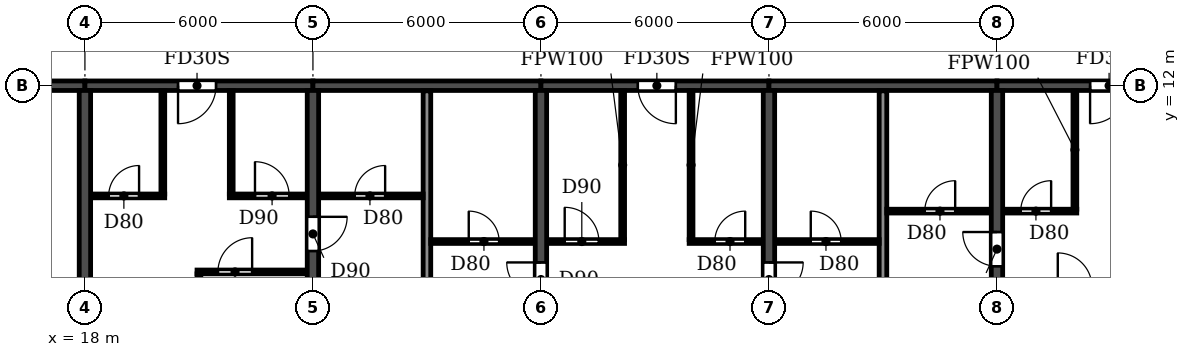
"""IFC4 building model, lengths in metres.
Left out: names, types, materials, properties, quantities, classifications, styles, units other than length and angle.
Written with IfcOpenShell. Run it as: python <this file> out.ifc"""

import sys

from ifc_helpers import new_model, si_unit, direction, frame, frame_2d, origin, place, context, subcontext, project, spatial, rectangle, extrude, element, fill, save


model = new_model("IFC4")
c1 = context("Model", 3, precision=1e-05, world=origin(), true_north=direction((0.0, 1.0)))
c2 = subcontext(c1, "Body", "Model", "MODEL_VIEW")
j1 = project(units=[si_unit("LENGTHUNIT", "METRE"), si_unit("PLANEANGLEUNIT", "RADIAN")], contexts=[c1])
p1 = place(None, origin())
s1 = spatial("IfcSite", under=j1, at=p1, CompositionType="ELEMENT")
p2 = place(p1, origin())
s2 = spatial("IfcBuilding", under=s1, at=p2, CompositionType="ELEMENT")
p3 = place(p2, frame((0.0, 0.0, 142.2)))
s3 = spatial("IfcBuildingStorey", under=s2, at=p3, CompositionType="ELEMENT", Elevation=142.2)
p4 = place(p3, frame((18.0, 0.2, 0.0), z_axis=(0.0, 0.0, 1.0), x_axis=(0.0, 1.0, 0.0)))
e1 = element("IfcWall", 1, at=p4, inside=s3, PredefinedType="SHEAR", context=c2, shape_type="SweptSolid", body=[
    extrude(rectangle(XDim=11.675, YDim=0.3, at=frame_2d((5.837, 0.0))), origin(), (0.0, 0.0, 1.0), 3.07),
])
p5 = place(p3, frame((24.0, 0.2, 0.0), z_axis=(0.0, 0.0, 1.0), x_axis=(0.0, 1.0, 0.0)))
e2 = element("IfcWall", 2, at=p5, inside=s3, PredefinedType="SHEAR", context=c2, shape_type="SweptSolid", body=[
    extrude(rectangle(XDim=11.675, YDim=0.3, at=frame_2d((5.837, 0.0))), origin(), (0.0, 0.0, 1.0), 3.07),
])
p6 = place(p5, frame((7.45, 0.0, 0.0)))
e3 = element("IfcOpeningElement", 3, at=p6, cuts=e2, PredefinedType="OPENING", context=c2, shape_type="SweptSolid", body=[
    extrude(rectangle(XDim=0.9, YDim=2.1, at=frame_2d((0.45, 1.05))), frame((0.0, 0.16, 0.0), z_axis=(0.0, -1.0, 0.0), x_axis=(1.0, 0.0, 0.0)), (0.0, 0.0, 1.0), 0.32),
])
p7 = place(p3, frame((30.0, 0.2, 0.0), z_axis=(0.0, 0.0, 1.0), x_axis=(0.0, 1.0, 0.0)))
e4 = element("IfcWall", 4, at=p7, inside=s3, PredefinedType="SHEAR", context=c2, shape_type="SweptSolid", body=[
    extrude(rectangle(XDim=11.675, YDim=0.3, at=frame_2d((5.837, 0.0))), origin(), (0.0, 0.0, 1.0), 3.07),
])
p8 = place(p7, frame((6.25, 0.0, 0.0)))
e5 = element("IfcOpeningElement", 5, at=p8, cuts=e4, PredefinedType="OPENING", context=c2, shape_type="SweptSolid", body=[
    extrude(rectangle(XDim=0.9, YDim=2.1, at=frame_2d((0.45, 1.05))), frame((0.0, 0.16, 0.0), z_axis=(0.0, -1.0, 0.0), x_axis=(1.0, 0.0, 0.0)), (0.0, 0.0, 1.0), 0.32),
])
p9 = place(p3, frame((36.0, 0.2, 0.0), z_axis=(0.0, 0.0, 1.0), x_axis=(0.0, 1.0, 0.0)))
e6 = element("IfcWall", 6, at=p9, inside=s3, PredefinedType="SHEAR", context=c2, shape_type="SweptSolid", body=[
    extrude(rectangle(XDim=11.675, YDim=0.3, at=frame_2d((5.837, 0.0))), origin(), (0.0, 0.0, 1.0), 3.07),
])
p10 = place(p9, frame((6.25, 0.0, 0.0)))
e7 = element("IfcOpeningElement", 7, at=p10, cuts=e6, PredefinedType="OPENING", context=c2, shape_type="SweptSolid", body=[
    extrude(rectangle(XDim=0.9, YDim=2.1, at=frame_2d((0.45, 1.05))), frame((0.0, 0.16, 0.0), z_axis=(0.0, -1.0, 0.0), x_axis=(1.0, 0.0, 0.0)), (0.0, 0.0, 1.0), 0.32),
])
p11 = place(p3, frame((42.0, 0.2, 0.0), z_axis=(0.0, 0.0, 1.0), x_axis=(0.0, 1.0, 0.0)))
e8 = element("IfcWall", 8, at=p11, inside=s3, PredefinedType="SHEAR", context=c2, shape_type="SweptSolid", body=[
    extrude(rectangle(XDim=11.675, YDim=0.3, at=frame_2d((5.837, 0.0))), origin(), (0.0, 0.0, 1.0), 3.07),
])
p12 = place(p11, frame((7.05, 0.0, 0.0)))
e9 = element("IfcOpeningElement", 9, at=p12, cuts=e8, PredefinedType="OPENING", context=c2, shape_type="SweptSolid", body=[
    extrude(rectangle(XDim=0.9, YDim=2.1, at=frame_2d((0.45, 1.05))), frame((0.0, 0.16, 0.0), z_axis=(0.0, -1.0, 0.0), x_axis=(1.0, 0.0, 0.0)), (0.0, 0.0, 1.0), 0.32),
])
p13 = place(p3, frame((12.2, 12.0, 0.0), z_axis=(0.0, 0.0, 1.0), x_axis=(1.0, 0.0, 0.0)))
e10 = element("IfcWall", 10, at=p13, inside=s3, PredefinedType="SHEAR", context=c2, shape_type="SweptSolid", body=[
    extrude(rectangle(XDim=5.8, YDim=0.25, at=frame_2d((2.9, 0.0))), origin(), (0.0, 0.0, 1.0), 2.47),
])
p14 = place(p13, frame((2.3, 0.0, 0.0)))
e11 = element("IfcOpeningElement", 11, at=p14, cuts=e10, PredefinedType="OPENING", context=c2, shape_type="SweptSolid", body=[
    extrude(rectangle(XDim=1.0, YDim=2.1, at=frame_2d((0.5, 1.05))), frame((0.0, 0.135, 0.0), z_axis=(0.0, -1.0, 0.0), x_axis=(1.0, 0.0, 0.0)), (0.0, 0.0, 1.0), 0.27),
])
p15 = place(p3, frame((18.0, 12.0, 0.0), z_axis=(0.0, 0.0, 1.0), x_axis=(1.0, 0.0, 0.0)))
e12 = element("IfcWall", 12, at=p15, inside=s3, PredefinedType="SHEAR", context=c2, shape_type="SweptSolid", body=[
    extrude(rectangle(XDim=6.0, YDim=0.25, at=frame_2d((3.0, 0.0))), origin(), (0.0, 0.0, 1.0), 2.47),
])
p16 = place(p15, frame((2.45, 0.0, 0.0)))
e13 = element("IfcOpeningElement", 13, at=p16, cuts=e12, PredefinedType="OPENING", context=c2, shape_type="SweptSolid", body=[
    extrude(rectangle(XDim=1.0, YDim=2.1, at=frame_2d((0.5, 1.05))), frame((0.0, 0.135, 0.0), z_axis=(0.0, -1.0, 0.0), x_axis=(1.0, 0.0, 0.0)), (0.0, 0.0, 1.0), 0.27),
])
p17 = place(p3, frame((24.0, 12.0, 0.0), z_axis=(0.0, 0.0, 1.0), x_axis=(1.0, 0.0, 0.0)))
e14 = element("IfcWall", 14, at=p17, inside=s3, PredefinedType="SHEAR", context=c2, shape_type="SweptSolid", body=[
    extrude(rectangle(XDim=6.0, YDim=0.25, at=frame_2d((3.0, 0.0))), origin(), (0.0, 0.0, 1.0), 2.47),
])
p18 = place(p3, frame((30.0, 12.0, 0.0), z_axis=(0.0, 0.0, 1.0), x_axis=(1.0, 0.0, 0.0)))
e15 = element("IfcWall", 15, at=p18, inside=s3, PredefinedType="SHEAR", context=c2, shape_type="SweptSolid", body=[
    extrude(rectangle(XDim=6.0, YDim=0.25, at=frame_2d((3.0, 0.0))), origin(), (0.0, 0.0, 1.0), 2.47),
])
p19 = place(p18, frame((2.55, 0.0, 0.0)))
e16 = element("IfcOpeningElement", 16, at=p19, cuts=e15, PredefinedType="OPENING", context=c2, shape_type="SweptSolid", body=[
    extrude(rectangle(XDim=1.0, YDim=2.1, at=frame_2d((0.5, 1.05))), frame((0.0, 0.135, 0.0), z_axis=(0.0, -1.0, 0.0), x_axis=(1.0, 0.0, 0.0)), (0.0, 0.0, 1.0), 0.27),
])
p20 = place(p3, frame((36.0, 12.0, 0.0), z_axis=(0.0, 0.0, 1.0), x_axis=(1.0, 0.0, 0.0)))
e17 = element("IfcWall", 17, at=p20, inside=s3, PredefinedType="SHEAR", context=c2, shape_type="SweptSolid", body=[
    extrude(rectangle(XDim=6.0, YDim=0.25, at=frame_2d((3.0, 0.0))), origin(), (0.0, 0.0, 1.0), 2.47),
])
p21 = place(p3, frame((42.0, 12.0, 0.0), z_axis=(0.0, 0.0, 1.0), x_axis=(1.0, 0.0, 0.0)))
e18 = element("IfcWall", 18, at=p21, inside=s3, PredefinedType="SHEAR", context=c2, shape_type="SweptSolid", body=[
    extrude(rectangle(XDim=6.0, YDim=0.25, at=frame_2d((3.0, 0.0))), origin(), (0.0, 0.0, 1.0), 2.47),
])
p22 = place(p21, frame((2.45, 0.0, 0.0)))
e19 = element("IfcOpeningElement", 19, at=p22, cuts=e18, PredefinedType="OPENING", context=c2, shape_type="SweptSolid", body=[
    extrude(rectangle(XDim=1.0, YDim=2.1, at=frame_2d((0.5, 1.05))), frame((0.0, 0.135, 0.0), z_axis=(0.0, -1.0, 0.0), x_axis=(1.0, 0.0, 0.0)), (0.0, 0.0, 1.0), 0.27),
])
for number, where, z_axis, x_axis in (
    (20, (27.0, 0.06, 0.0), (0.0, 0.0, 1.0), (0.0, 1.0, 0.0)),
    (21, (39.0, 0.06, 0.0), (0.0, 0.0, 1.0), (0.0, 1.0, 0.0)),
):
    element("IfcWall", number, at=place(p3, frame(where, z_axis=z_axis, x_axis=x_axis)), inside=s3, PredefinedType="PARTITIONING", context=c2, shape_type="SweptSolid", body=[
        extrude(rectangle(XDim=11.805, YDim=0.2, at=frame_2d((5.902, 0.0))), origin(), (0.0, 0.0, 1.0), 3.07),
    ])
p23 = place(p3, frame((20.95, 7.1, 0.0), z_axis=(0.0, 0.0, 1.0), x_axis=(1.0, 0.0, 0.0)))
e22 = element("IfcWall", 22, at=p23, inside=s3, PredefinedType="PARTITIONING", context=c2, shape_type="SweptSolid", body=[
    extrude(rectangle(XDim=2.89, YDim=0.1, at=frame_2d((1.445, 0.0))), origin(), (0.0, 0.0, 1.0), 3.07),
])
p24 = place(p23, frame((0.55, 0.0, 0.0)))
e23 = element("IfcOpeningElement", 23, at=p24, cuts=e22, PredefinedType="OPENING", context=c2, shape_type="SweptSolid", body=[
    extrude(rectangle(XDim=0.9, YDim=2.1, at=frame_2d((0.45, 1.05))), frame((0.0, 0.06, 0.0), z_axis=(0.0, -1.0, 0.0), x_axis=(1.0, 0.0, 0.0)), (0.0, 0.0, 1.0), 0.12),
])
p25 = place(p3, frame((27.1, 7.9, 0.0), z_axis=(0.0, 0.0, 1.0), x_axis=(1.0, 0.0, 0.0)))
e24 = element("IfcWall", 24, at=p25, inside=s3, PredefinedType="PARTITIONING", context=c2, shape_type="SweptSolid", body=[
    extrude(rectangle(XDim=2.74, YDim=0.1, at=frame_2d((1.37, 0.0))), origin(), (0.0, 0.0, 1.0), 3.07),
])
p26 = place(p25, frame((1.0, 0.0, 0.0)))
e25 = element("IfcOpeningElement", 25, at=p26, cuts=e24, PredefinedType="OPENING", context=c2, shape_type="SweptSolid", body=[
    extrude(rectangle(XDim=0.8, YDim=2.1, at=frame_2d((0.4, 1.05))), frame((0.0, 0.06, 0.0), z_axis=(0.0, -1.0, 0.0), x_axis=(1.0, 0.0, 0.0)), (0.0, 0.0, 1.0), 0.12),
])
p27 = place(p3, frame((30.16, 7.9, 0.0), z_axis=(0.0, 0.0, 1.0), x_axis=(1.0, 0.0, 0.0)))
e26 = element("IfcWall", 26, at=p27, inside=s3, PredefinedType="PARTITIONING", context=c2, shape_type="SweptSolid", body=[
    extrude(rectangle(XDim=2.04, YDim=0.1, at=frame_2d((1.02, 0.0))), origin(), (0.0, 0.0, 1.0), 3.07),
])
p28 = place(p27, frame((0.465, 0.0, 0.0)))
e27 = element("IfcOpeningElement", 27, at=p28, cuts=e26, PredefinedType="OPENING", context=c2, shape_type="SweptSolid", body=[
    extrude(rectangle(XDim=0.9, YDim=2.1, at=frame_2d((0.45, 1.05))), frame((0.0, 0.06, 0.0), z_axis=(0.0, -1.0, 0.0), x_axis=(1.0, 0.0, 0.0)), (0.0, 0.0, 1.0), 0.12),
])
p29 = place(p3, frame((33.9, 7.9, 0.0), z_axis=(0.0, 0.0, 1.0), x_axis=(1.0, 0.0, 0.0)))
e28 = element("IfcWall", 28, at=p29, inside=s3, PredefinedType="PARTITIONING", context=c2, shape_type="SweptSolid", body=[
    extrude(rectangle(XDim=1.94, YDim=0.1, at=frame_2d((0.97, 0.0))), origin(), (0.0, 0.0, 1.0), 3.07),
])
p30 = place(p29, frame((0.675, 0.0, 0.0)))
e29 = element("IfcOpeningElement", 29, at=p30, cuts=e28, PredefinedType="OPENING", context=c2, shape_type="SweptSolid", body=[
    extrude(rectangle(XDim=0.8, YDim=2.1, at=frame_2d((0.4, 1.05))), frame((0.0, 0.06, 0.0), z_axis=(0.0, -1.0, 0.0), x_axis=(1.0, 0.0, 0.0)), (0.0, 0.0, 1.0), 0.12),
])
p31 = place(p3, frame((36.16, 7.9, 0.0), z_axis=(0.0, 0.0, 1.0), x_axis=(1.0, 0.0, 0.0)))
e30 = element("IfcWall", 30, at=p31, inside=s3, PredefinedType="PARTITIONING", context=c2, shape_type="SweptSolid", body=[
    extrude(rectangle(XDim=2.74, YDim=0.1, at=frame_2d((1.37, 0.0))), origin(), (0.0, 0.0, 1.0), 3.07),
])
p32 = place(p31, frame((0.94, 0.0, 0.0)))
e31 = element("IfcOpeningElement", 31, at=p32, cuts=e30, PredefinedType="OPENING", context=c2, shape_type="SweptSolid", body=[
    extrude(rectangle(XDim=0.8, YDim=2.1, at=frame_2d((0.4, 1.05))), frame((0.0, 0.06, 0.0), z_axis=(0.0, -1.0, 0.0), x_axis=(1.0, 0.0, 0.0)), (0.0, 0.0, 1.0), 0.12),
])
p33 = place(p3, frame((39.1, 8.7, 0.0), z_axis=(0.0, 0.0, 1.0), x_axis=(1.0, 0.0, 0.0)))
e32 = element("IfcWall", 32, at=p33, inside=s3, PredefinedType="PARTITIONING", context=c2, shape_type="SweptSolid", body=[
    extrude(rectangle(XDim=2.74, YDim=0.1, at=frame_2d((1.37, 0.0))), origin(), (0.0, 0.0, 1.0), 3.07),
])
p34 = place(p33, frame((1.0, 0.0, 0.0)))
e33 = element("IfcOpeningElement", 33, at=p34, cuts=e32, PredefinedType="OPENING", context=c2, shape_type="SweptSolid", body=[
    extrude(rectangle(XDim=0.8, YDim=2.1, at=frame_2d((0.4, 1.05))), frame((0.0, 0.06, 0.0), z_axis=(0.0, -1.0, 0.0), x_axis=(1.0, 0.0, 0.0)), (0.0, 0.0, 1.0), 0.12),
])
p35 = place(p3, frame((42.16, 8.7, 0.0), z_axis=(0.0, 0.0, 1.0), x_axis=(1.0, 0.0, 0.0)))
e34 = element("IfcWall", 34, at=p35, inside=s3, PredefinedType="PARTITIONING", context=c2, shape_type="SweptSolid", body=[
    extrude(rectangle(XDim=1.94, YDim=0.1, at=frame_2d((0.97, 0.0))), origin(), (0.0, 0.0, 1.0), 3.07),
])
p36 = place(p35, frame((0.465, 0.0, 0.0)))
e35 = element("IfcOpeningElement", 35, at=p36, cuts=e34, PredefinedType="OPENING", context=c2, shape_type="SweptSolid", body=[
    extrude(rectangle(XDim=0.8, YDim=2.1, at=frame_2d((0.4, 1.05))), frame((0.0, 0.06, 0.0), z_axis=(0.0, -1.0, 0.0), x_axis=(1.0, 0.0, 0.0)), (0.0, 0.0, 1.0), 0.12),
])
p37 = place(p3, frame((18.16, 9.1, 0.0), z_axis=(0.0, 0.0, 1.0), x_axis=(1.0, 0.0, 0.0)))
e36 = element("IfcWall", 36, at=p37, inside=s3, PredefinedType="PARTITIONING", context=c2, shape_type="SweptSolid", body=[
    extrude(rectangle(XDim=1.94, YDim=0.1, at=frame_2d((0.97, 0.0))), origin(), (0.0, 0.0, 1.0), 3.07),
])
p38 = place(p37, frame((0.465, 0.0, 0.0)))
e37 = element("IfcOpeningElement", 37, at=p38, cuts=e36, PredefinedType="OPENING", context=c2, shape_type="SweptSolid", body=[
    extrude(rectangle(XDim=0.8, YDim=2.1, at=frame_2d((0.4, 1.05))), frame((0.0, 0.06, 0.0), z_axis=(0.0, -1.0, 0.0), x_axis=(1.0, 0.0, 0.0)), (0.0, 0.0, 1.0), 0.12),
])
p39 = place(p3, frame((21.8, 9.1, 0.0), z_axis=(0.0, 0.0, 1.0), x_axis=(1.0, 0.0, 0.0)))
e38 = element("IfcWall", 38, at=p39, inside=s3, PredefinedType="PARTITIONING", context=c2, shape_type="SweptSolid", body=[
    extrude(rectangle(XDim=2.04, YDim=0.1, at=frame_2d((1.02, 0.0))), origin(), (0.0, 0.0, 1.0), 3.07),
])
p40 = place(p39, frame((0.675, 0.0, 0.0)))
e39 = element("IfcOpeningElement", 39, at=p40, cuts=e38, PredefinedType="OPENING", context=c2, shape_type="SweptSolid", body=[
    extrude(rectangle(XDim=0.9, YDim=2.1, at=frame_2d((0.45, 1.05))), frame((0.0, 0.06, 0.0), z_axis=(0.0, -1.0, 0.0), x_axis=(1.0, 0.0, 0.0)), (0.0, 0.0, 1.0), 0.12),
])
p41 = place(p3, frame((24.16, 9.1, 0.0), z_axis=(0.0, 0.0, 1.0), x_axis=(1.0, 0.0, 0.0)))
e40 = element("IfcWall", 40, at=p41, inside=s3, PredefinedType="PARTITIONING", context=c2, shape_type="SweptSolid", body=[
    extrude(rectangle(XDim=2.74, YDim=0.1, at=frame_2d((1.37, 0.0))), origin(), (0.0, 0.0, 1.0), 3.07),
])
p42 = place(p41, frame((0.94, 0.0, 0.0)))
e41 = element("IfcOpeningElement", 41, at=p42, cuts=e40, PredefinedType="OPENING", context=c2, shape_type="SweptSolid", body=[
    extrude(rectangle(XDim=0.8, YDim=2.1, at=frame_2d((0.4, 1.05))), frame((0.0, 0.06, 0.0), z_axis=(0.0, -1.0, 0.0), x_axis=(1.0, 0.0, 0.0)), (0.0, 0.0, 1.0), 0.12),
])
p43 = place(p3, frame((20.05, 9.15, 0.0), z_axis=(0.0, 0.0, 1.0), x_axis=(0.0, 1.0, 0.0)))
e42 = element("IfcWall", 42, at=p43, inside=s3, PredefinedType="PARTITIONING", context=c2, shape_type="SweptSolid", body=[
    extrude(rectangle(XDim=2.715, YDim=0.1, at=frame_2d((1.357, 0.0))), origin(), (0.0, 0.0, 1.0), 3.07),
])
p44 = place(p3, frame((21.0, 0.06, 0.0), z_axis=(0.0, 0.0, 1.0), x_axis=(0.0, 1.0, 0.0)))
e43 = element("IfcWall", 43, at=p44, inside=s3, PredefinedType="PARTITIONING", context=c2, shape_type="SweptSolid", body=[
    extrude(rectangle(XDim=6.99, YDim=0.1, at=frame_2d((3.495, 0.0))), origin(), (0.0, 0.0, 1.0), 3.07),
])
p45 = place(p3, frame((21.85, 9.15, 0.0), z_axis=(0.0, 0.0, 1.0), x_axis=(0.0, 1.0, 0.0)))
e44 = element("IfcWall", 44, at=p45, inside=s3, PredefinedType="PARTITIONING", context=c2, shape_type="SweptSolid", body=[
    extrude(rectangle(XDim=2.715, YDim=0.1, at=frame_2d((1.357, 0.0))), origin(), (0.0, 0.0, 1.0), 3.07),
])
for number, where, z_axis, x_axis in (
    (45, (32.15, 7.95, 0.0), (0.0, 0.0, 1.0), (0.0, 1.0, 0.0)),
    (46, (33.95, 7.95, 0.0), (0.0, 0.0, 1.0), (0.0, 1.0, 0.0)),
):
    element("IfcWall", number, at=place(p3, frame(where, z_axis=z_axis, x_axis=x_axis)), inside=s3, PredefinedType="PARTITIONING", context=c2, shape_type="SweptSolid", body=[
        extrude(rectangle(XDim=3.915, YDim=0.1, at=frame_2d((1.958, 0.0))), origin(), (0.0, 0.0, 1.0), 3.07),
    ])
p46 = place(p3, frame((44.05, 8.75, 0.0), z_axis=(0.0, 0.0, 1.0), x_axis=(0.0, 1.0, 0.0)))
e47 = element("IfcWall", 47, at=p46, inside=s3, PredefinedType="PARTITIONING", context=c2, shape_type="SweptSolid", body=[
    extrude(rectangle(XDim=3.115, YDim=0.1, at=frame_2d((1.558, 0.0))), origin(), (0.0, 0.0, 1.0), 3.07),
])
p47 = place(p42, origin())
e48 = element("IfcDoor", 48, at=p47, inside=s3, OperationType="SINGLE_SWING_RIGHT", PredefinedType="DOOR", context=c2, shape_type="SweptSolid", body=[
    extrude(rectangle(XDim=0.8, YDim=2.1, at=frame_2d((0.4, 1.05))), frame((0.0, 0.025, 0.0), z_axis=(0.0, -1.0, 0.0), x_axis=(1.0, 0.0, 0.0)), (0.0, 0.0, 1.0), 0.05),
])
fill(e41, e48)
p48 = place(p38, origin())
e49 = element("IfcDoor", 49, at=p48, inside=s3, OperationType="SINGLE_SWING_RIGHT", PredefinedType="DOOR", context=c2, shape_type="SweptSolid", body=[
    extrude(rectangle(XDim=0.8, YDim=2.1, at=frame_2d((0.4, 1.05))), frame((0.0, 0.025, 0.0), z_axis=(0.0, -1.0, 0.0), x_axis=(1.0, 0.0, 0.0)), (0.0, 0.0, 1.0), 0.05),
])
fill(e37, e49)
p49 = place(p16, frame((1.0, 0.0, 0.0), z_axis=(0.0, 0.0, 1.0), x_axis=(-1.0, 0.0, 0.0)))
e50 = element("IfcDoor", 50, at=p49, inside=s3, OperationType="SINGLE_SWING_RIGHT", PredefinedType="DOOR", context=c2, shape_type="SweptSolid", body=[
    extrude(rectangle(XDim=1.0, YDim=2.1, at=frame_2d((0.5, 1.05))), frame((0.0, 0.025, 0.0), z_axis=(0.0, -1.0, 0.0), x_axis=(1.0, 0.0, 0.0)), (0.0, 0.0, 1.0), 0.05),
])
fill(e13, e50)
p50 = place(p24, origin())
e51 = element("IfcDoor", 51, at=p50, inside=s3, OperationType="SINGLE_SWING_RIGHT", PredefinedType="DOOR", context=c2, shape_type="SweptSolid", body=[
    extrude(rectangle(XDim=0.9, YDim=2.1, at=frame_2d((0.45, 1.05))), frame((0.0, 0.025, 0.0), z_axis=(0.0, -1.0, 0.0), x_axis=(1.0, 0.0, 0.0)), (0.0, 0.0, 1.0), 0.05),
])
fill(e23, e51)
p51 = place(p40, origin())
e52 = element("IfcDoor", 52, at=p51, inside=s3, OperationType="SINGLE_SWING_LEFT", PredefinedType="DOOR", context=c2, shape_type="SweptSolid", body=[
    extrude(rectangle(XDim=0.9, YDim=2.1, at=frame_2d((0.45, 1.05))), frame((0.0, 0.025, 0.0), z_axis=(0.0, -1.0, 0.0), x_axis=(1.0, 0.0, 0.0)), (0.0, 0.0, 1.0), 0.05),
])
fill(e39, e52)
p52 = place(p6, frame((0.9, 0.0, 0.0), z_axis=(0.0, 0.0, 1.0), x_axis=(-1.0, 0.0, 0.0)))
e53 = element("IfcDoor", 53, at=p52, inside=s3, OperationType="SINGLE_SWING_LEFT", PredefinedType="DOOR", context=c2, shape_type="SweptSolid", body=[
    extrude(rectangle(XDim=0.9, YDim=2.1, at=frame_2d((0.45, 1.05))), frame((0.0, 0.025, 0.0), z_axis=(0.0, -1.0, 0.0), x_axis=(1.0, 0.0, 0.0)), (0.0, 0.0, 1.0), 0.05),
])
fill(e3, e53)
p53 = place(p26, origin())
e54 = element("IfcDoor", 54, at=p53, inside=s3, OperationType="SINGLE_SWING_LEFT", PredefinedType="DOOR", context=c2, shape_type="SweptSolid", body=[
    extrude(rectangle(XDim=0.8, YDim=2.1, at=frame_2d((0.4, 1.05))), frame((0.0, 0.025, 0.0), z_axis=(0.0, -1.0, 0.0), x_axis=(1.0, 0.0, 0.0)), (0.0, 0.0, 1.0), 0.05),
])
fill(e25, e54)
p54 = place(p32, origin())
e55 = element("IfcDoor", 55, at=p54, inside=s3, OperationType="SINGLE_SWING_LEFT", PredefinedType="DOOR", context=c2, shape_type="SweptSolid", body=[
    extrude(rectangle(XDim=0.8, YDim=2.1, at=frame_2d((0.4, 1.05))), frame((0.0, 0.025, 0.0), z_axis=(0.0, -1.0, 0.0), x_axis=(1.0, 0.0, 0.0)), (0.0, 0.0, 1.0), 0.05),
])
fill(e31, e55)
p55 = place(p8, origin())
e56 = element("IfcDoor", 56, at=p55, inside=s3, OperationType="SINGLE_SWING_RIGHT", PredefinedType="DOOR", context=c2, shape_type="SweptSolid", body=[
    extrude(rectangle(XDim=0.9, YDim=2.1, at=frame_2d((0.45, 1.05))), frame((0.0, 0.025, 0.0), z_axis=(0.0, -1.0, 0.0), x_axis=(1.0, 0.0, 0.0)), (0.0, 0.0, 1.0), 0.05),
])
fill(e5, e56)
p56 = place(p28, origin())
e57 = element("IfcDoor", 57, at=p56, inside=s3, OperationType="SINGLE_SWING_LEFT", PredefinedType="DOOR", context=c2, shape_type="SweptSolid", body=[
    extrude(rectangle(XDim=0.9, YDim=2.1, at=frame_2d((0.45, 1.05))), frame((0.0, 0.025, 0.0), z_axis=(0.0, -1.0, 0.0), x_axis=(1.0, 0.0, 0.0)), (0.0, 0.0, 1.0), 0.05),
])
fill(e27, e57)
p57 = place(p19, frame((1.0, 0.0, 0.0), z_axis=(0.0, 0.0, 1.0), x_axis=(-1.0, 0.0, 0.0)))
e58 = element("IfcDoor", 58, at=p57, inside=s3, OperationType="SINGLE_SWING_LEFT", PredefinedType="DOOR", context=c2, shape_type="SweptSolid", body=[
    extrude(rectangle(XDim=1.0, YDim=2.1, at=frame_2d((0.5, 1.05))), frame((0.0, 0.025, 0.0), z_axis=(0.0, -1.0, 0.0), x_axis=(1.0, 0.0, 0.0)), (0.0, 0.0, 1.0), 0.05),
])
fill(e16, e58)
p58 = place(p30, origin())
e59 = element("IfcDoor", 59, at=p58, inside=s3, OperationType="SINGLE_SWING_RIGHT", PredefinedType="DOOR", context=c2, shape_type="SweptSolid", body=[
    extrude(rectangle(XDim=0.8, YDim=2.1, at=frame_2d((0.4, 1.05))), frame((0.0, 0.025, 0.0), z_axis=(0.0, -1.0, 0.0), x_axis=(1.0, 0.0, 0.0)), (0.0, 0.0, 1.0), 0.05),
])
fill(e29, e59)
p59 = place(p10, frame((0.9, 0.0, 0.0), z_axis=(0.0, 0.0, 1.0), x_axis=(-1.0, 0.0, 0.0)))
e60 = element("IfcDoor", 60, at=p59, inside=s3, OperationType="SINGLE_SWING_LEFT", PredefinedType="DOOR", context=c2, shape_type="SweptSolid", body=[
    extrude(rectangle(XDim=0.9, YDim=2.1, at=frame_2d((0.45, 1.05))), frame((0.0, 0.025, 0.0), z_axis=(0.0, -1.0, 0.0), x_axis=(1.0, 0.0, 0.0)), (0.0, 0.0, 1.0), 0.05),
])
fill(e7, e60)
p60 = place(p34, origin())
e61 = element("IfcDoor", 61, at=p60, inside=s3, OperationType="SINGLE_SWING_RIGHT", PredefinedType="DOOR", context=c2, shape_type="SweptSolid", body=[
    extrude(rectangle(XDim=0.8, YDim=2.1, at=frame_2d((0.4, 1.05))), frame((0.0, 0.025, 0.0), z_axis=(0.0, -1.0, 0.0), x_axis=(1.0, 0.0, 0.0)), (0.0, 0.0, 1.0), 0.05),
])
fill(e33, e61)
p61 = place(p12, origin())
e62 = element("IfcDoor", 62, at=p61, inside=s3, OperationType="SINGLE_SWING_RIGHT", PredefinedType="DOOR", context=c2, shape_type="SweptSolid", body=[
    extrude(rectangle(XDim=0.9, YDim=2.1, at=frame_2d((0.45, 1.05))), frame((0.0, 0.025, 0.0), z_axis=(0.0, -1.0, 0.0), x_axis=(1.0, 0.0, 0.0)), (0.0, 0.0, 1.0), 0.05),
])
fill(e9, e62)
p62 = place(p36, origin())
e63 = element("IfcDoor", 63, at=p62, inside=s3, OperationType="SINGLE_SWING_RIGHT", PredefinedType="DOOR", context=c2, shape_type="SweptSolid", body=[
    extrude(rectangle(XDim=0.8, YDim=2.1, at=frame_2d((0.4, 1.05))), frame((0.0, 0.025, 0.0), z_axis=(0.0, -1.0, 0.0), x_axis=(1.0, 0.0, 0.0)), (0.0, 0.0, 1.0), 0.05),
])
fill(e35, e63)
p63 = place(p22, frame((1.0, 0.0, 0.0), z_axis=(0.0, 0.0, 1.0), x_axis=(-1.0, 0.0, 0.0)))
e64 = element("IfcDoor", 64, at=p63, inside=s3, OperationType="SINGLE_SWING_RIGHT", PredefinedType="DOOR", context=c2, shape_type="SweptSolid", body=[
    extrude(rectangle(XDim=1.0, YDim=2.1, at=frame_2d((0.5, 1.05))), frame((0.0, 0.025, 0.0), z_axis=(0.0, -1.0, 0.0), x_axis=(1.0, 0.0, 0.0)), (0.0, 0.0, 1.0), 0.05),
])
fill(e19, e64)
save(model, sys.argv[1])
